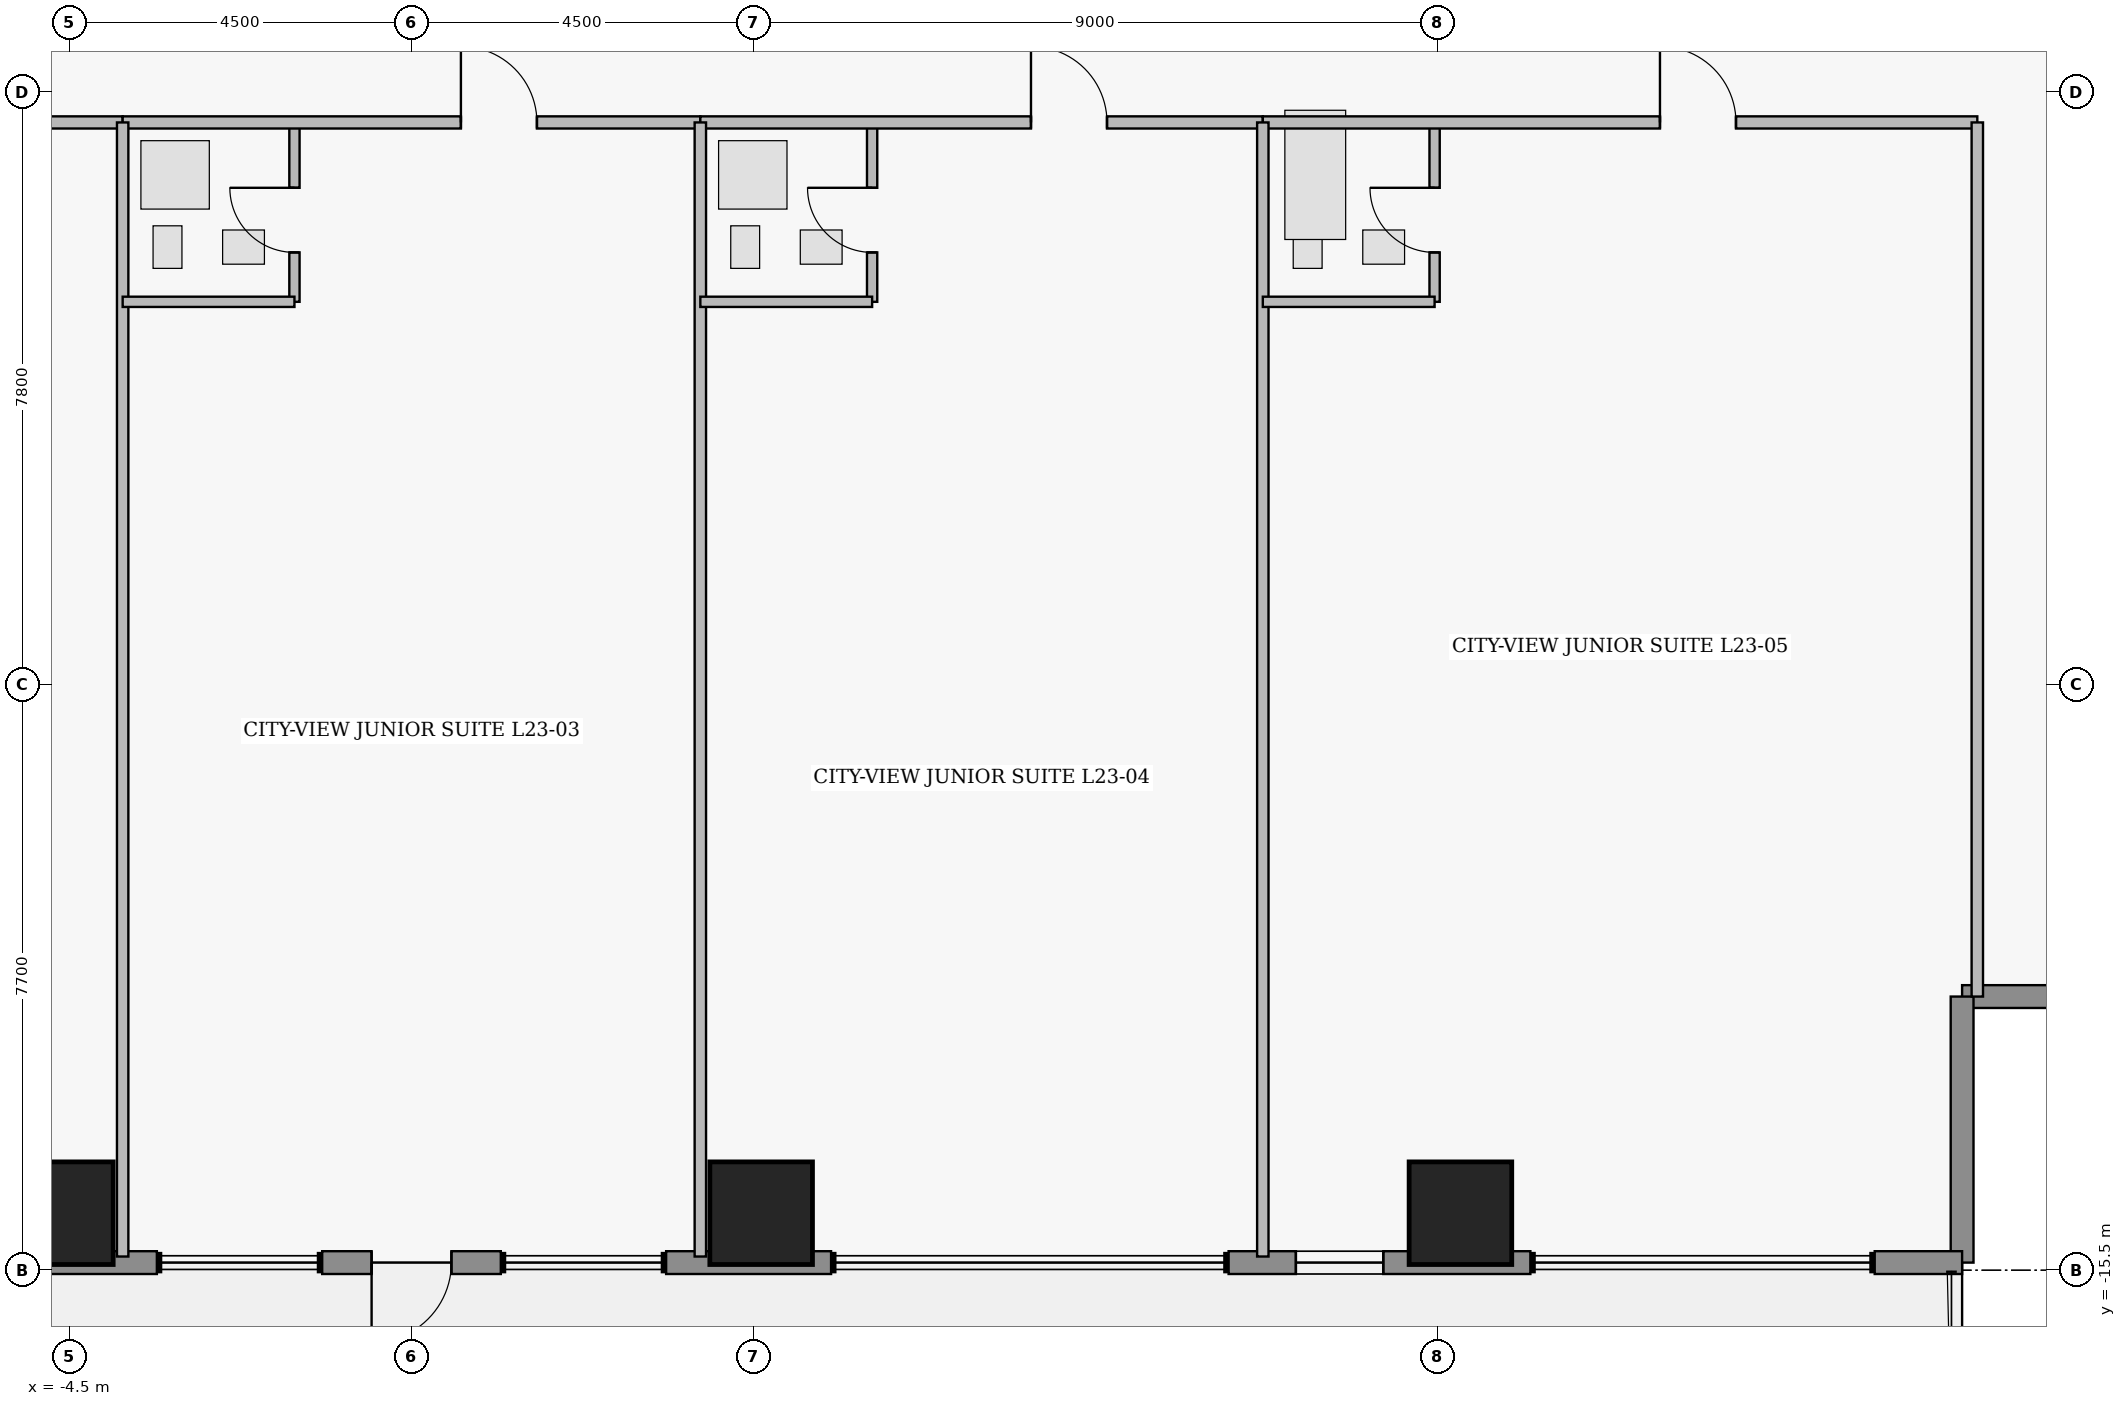
"""IFC4 building model, lengths in metres.
Left out: names, types, materials, properties, quantities, classifications, styles, units other than length and angle.
Written with IfcOpenShell. Run it as: python <this file> out.ifc"""

import sys

from ifc_helpers import new_model, si_unit, direction, frame, frame_2d, origin, origin_2d, place, context, subcontext, project, spatial, rectangle, extrude, element, fill, save


model = new_model("IFC4")
c1 = context("Model", 3, precision=1e-05, world=origin(), true_north=direction((0.0, 1.0)))
c2 = subcontext(c1, "Body", "Model", "MODEL_VIEW")
j1 = project(units=[si_unit("LENGTHUNIT", "METRE"), si_unit("PLANEANGLEUNIT", "RADIAN")], contexts=[c1])
p1 = place(None, origin())
s1 = spatial("IfcSite", under=j1, at=p1, CompositionType="ELEMENT")
p2 = place(p1, origin())
s2 = spatial("IfcBuilding", under=s1, at=p2, CompositionType="ELEMENT")
p3 = place(p2, frame((0.0, 0.0, 95.65)))
s3 = spatial("IfcBuildingStorey", under=s2, at=p3, CompositionType="ELEMENT", Elevation=95.65)
for number, where, z_axis, x_axis in (
    (1, (-4.6, -14.75, 0.43), (0.0, 0.0, 1.0), (1.0, 0.0, 0.0)),
    (2, (4.6, -14.75, 0.43), (0.0, 0.0, 1.0), (1.0, 0.0, 0.0)),
    (3, (13.8, -14.75, 0.43), (0.0, 0.0, 1.0), (1.0, 0.0, 0.0)),
):
    element("IfcColumn", number, at=place(p3, frame(where, z_axis=z_axis, x_axis=x_axis)), inside=s3, PredefinedType="COLUMN", context=c2, shape_type="SweptSolid", body=[
        extrude(rectangle(XDim=1.35, YDim=1.35, at=origin_2d()), origin(), (0.0, 0.0, 1.0), 3.22),
    ])
for number, where, z_axis, x_axis in (
    (4, (23.9, -11.9, 0.0), (0.0, 0.0, 1.0), (-1.0, 0.0, 0.0)),
    (5, (20.4, -11.9, 0.0), (0.0, 0.0, 1.0), (0.0, -1.0, 0.0)),
):
    element("IfcWall", number, at=place(p3, frame(where, z_axis=z_axis, x_axis=x_axis)), inside=s3, PredefinedType="STANDARD", context=c2, shape_type="SweptSolid", body=[
        extrude(rectangle(XDim=3.5, YDim=0.3, at=frame_2d((1.75, 0.0))), origin(), (0.0, 0.0, 1.0), 3.43),
    ])
p4 = place(p3, frame((20.4, -15.4, 0.0), z_axis=(0.0, 0.0, 1.0), x_axis=(-1.0, 0.0, 0.0)))
e6 = element("IfcWall", 6, at=p4, inside=s3, PredefinedType="STANDARD", context=c2, shape_type="SweptSolid", body=[
    extrude(rectangle(XDim=1.15, YDim=0.3, at=frame_2d((0.575, 0.0))), origin(), (0.0, 0.0, 1.0), 3.43),
])
p5 = place(p3, frame((14.72, -15.4, 0.0), z_axis=(0.0, 0.0, 1.0), x_axis=(-1.0, 0.0, 0.0)))
e7 = element("IfcWall", 7, at=p5, inside=s3, PredefinedType="STANDARD", context=c2, shape_type="SweptSolid", body=[
    extrude(rectangle(XDim=3.97, YDim=0.3, at=frame_2d((1.985, 0.0))), origin(), (0.0, 0.0, 1.0), 3.43),
])
p6 = place(p5, frame((1.935, 0.0, 0.95)))
e8 = element("IfcOpeningElement", 8, at=p6, cuts=e7, PredefinedType="OPENING", context=c2, shape_type="SweptSolid", body=[
    extrude(rectangle(XDim=1.15, YDim=1.55, at=frame_2d((0.575, 0.775))), frame((0.0, 0.16, 0.0), z_axis=(0.0, -1.0, 0.0), x_axis=(1.0, 0.0, 0.0)), (0.0, 0.0, 1.0), 0.32),
])
p7 = place(p3, frame((5.52, -15.4, 0.0), z_axis=(0.0, 0.0, 1.0), x_axis=(-1.0, 0.0, 0.0)))
e9 = element("IfcWall", 9, at=p7, inside=s3, PredefinedType="STANDARD", context=c2, shape_type="SweptSolid", body=[
    extrude(rectangle(XDim=2.17, YDim=0.3, at=frame_2d((1.085, 0.0))), origin(), (0.0, 0.0, 1.0), 3.43),
])
p8 = place(p3, frame((1.175, -15.4, 0.0), z_axis=(0.0, 0.0, 1.0), x_axis=(-1.0, 0.0, 0.0)))
e10 = element("IfcWall", 10, at=p8, inside=s3, PredefinedType="STANDARD", context=c2, shape_type="SweptSolid", body=[
    extrude(rectangle(XDim=2.35, YDim=0.3, at=frame_2d((1.175, 0.0))), origin(), (0.0, 0.0, 1.0), 3.43),
])
p9 = place(p8, frame((0.65, 0.0, 0.0)))
e11 = element("IfcOpeningElement", 11, at=p9, cuts=e10, PredefinedType="OPENING", context=c2, shape_type="SweptSolid", body=[
    extrude(rectangle(XDim=1.05, YDim=2.2, at=frame_2d((0.525, 1.1))), frame((0.0, 0.16, 0.0), z_axis=(0.0, -1.0, 0.0), x_axis=(1.0, 0.0, 0.0)), (0.0, 0.0, 1.0), 0.32),
])
p10 = place(p3, frame((-3.35, -15.4, 0.0), z_axis=(0.0, 0.0, 1.0), x_axis=(-1.0, 0.0, 0.0)))
e12 = element("IfcWall", 12, at=p10, inside=s3, PredefinedType="STANDARD", context=c2, shape_type="SweptSolid", body=[
    extrude(rectangle(XDim=2.17, YDim=0.3, at=frame_2d((1.085, 0.0))), origin(), (0.0, 0.0, 1.0), 3.43),
])
p11 = place(p3, frame((-11.2, -0.4, 0.0), z_axis=(0.0, 0.0, 1.0), x_axis=(1.0, 0.0, 0.0)))
e13 = element("IfcWall", 13, at=p11, inside=s3, PredefinedType="PARTITIONING", context=c2, shape_type="SweptSolid", body=[
    extrude(rectangle(XDim=7.4, YDim=0.16, at=frame_2d((3.7, 0.0))), origin(), (0.0, 0.0, 1.0), 3.43),
])
p12 = place(p11, frame((4.35, 0.0, 0.0)))
e14 = element("IfcOpeningElement", 14, at=p12, cuts=e13, PredefinedType="OPENING", context=c2, shape_type="SweptSolid", body=[
    extrude(rectangle(XDim=1.0, YDim=2.15, at=frame_2d((0.5, 1.075))), frame((0.0, 0.09, 0.0), z_axis=(0.0, -1.0, 0.0), x_axis=(1.0, 0.0, 0.0)), (0.0, 0.0, 1.0), 0.18),
])
p13 = place(p3, frame((-1.54, -2.76, 0.0), z_axis=(0.0, 0.0, 1.0), x_axis=(0.0, 1.0, 0.0)))
e15 = element("IfcWall", 15, at=p13, inside=s3, PredefinedType="PLUMBINGWALL", context=c2, shape_type="SweptSolid", body=[
    extrude(rectangle(XDim=2.36, YDim=0.135, at=frame_2d((1.18, 0.0))), origin(), (0.0, 0.0, 1.0), 3.43),
])
p14 = place(p13, frame((0.65, 0.0, 0.0)))
e16 = element("IfcOpeningElement", 16, at=p14, cuts=e15, PredefinedType="OPENING", context=c2, shape_type="SweptSolid", body=[
    extrude(rectangle(XDim=0.85, YDim=2.1, at=frame_2d((0.425, 1.05))), frame((0.0, 0.077, 0.0), z_axis=(0.0, -1.0, 0.0), x_axis=(1.0, 0.0, 0.0)), (0.0, 0.0, 1.0), 0.155),
])
p15 = place(p3, frame((-3.8, -0.4, 0.0), z_axis=(0.0, 0.0, 1.0), x_axis=(1.0, 0.0, 0.0)))
e17 = element("IfcWall", 17, at=p15, inside=s3, PredefinedType="PARTITIONING", context=c2, shape_type="SweptSolid", body=[
    extrude(rectangle(XDim=7.6, YDim=0.16, at=frame_2d((3.8, 0.0))), origin(), (0.0, 0.0, 1.0), 3.43),
])
p16 = place(p15, frame((4.45, 0.0, 0.0)))
e18 = element("IfcOpeningElement", 18, at=p16, cuts=e17, PredefinedType="OPENING", context=c2, shape_type="SweptSolid", body=[
    extrude(rectangle(XDim=1.0, YDim=2.15, at=frame_2d((0.5, 1.075))), frame((0.0, 0.09, 0.0), z_axis=(0.0, -1.0, 0.0), x_axis=(1.0, 0.0, 0.0)), (0.0, 0.0, 1.0), 0.18),
])
p17 = place(p3, frame((6.06, -2.76, 0.0), z_axis=(0.0, 0.0, 1.0), x_axis=(0.0, 1.0, 0.0)))
e19 = element("IfcWall", 19, at=p17, inside=s3, PredefinedType="PLUMBINGWALL", context=c2, shape_type="SweptSolid", body=[
    extrude(rectangle(XDim=2.36, YDim=0.135, at=frame_2d((1.18, 0.0))), origin(), (0.0, 0.0, 1.0), 3.43),
])
p18 = place(p17, frame((0.65, 0.0, 0.0)))
e20 = element("IfcOpeningElement", 20, at=p18, cuts=e19, PredefinedType="OPENING", context=c2, shape_type="SweptSolid", body=[
    extrude(rectangle(XDim=0.85, YDim=2.1, at=frame_2d((0.425, 1.05))), frame((0.0, 0.077, 0.0), z_axis=(0.0, -1.0, 0.0), x_axis=(1.0, 0.0, 0.0)), (0.0, 0.0, 1.0), 0.155),
])
p19 = place(p3, frame((3.8, -0.4, 0.0), z_axis=(0.0, 0.0, 1.0), x_axis=(1.0, 0.0, 0.0)))
e21 = element("IfcWall", 21, at=p19, inside=s3, PredefinedType="PARTITIONING", context=c2, shape_type="SweptSolid", body=[
    extrude(rectangle(XDim=7.4, YDim=0.16, at=frame_2d((3.7, 0.0))), origin(), (0.0, 0.0, 1.0), 3.43),
])
p20 = place(p19, frame((4.35, 0.0, 0.0)))
e22 = element("IfcOpeningElement", 22, at=p20, cuts=e21, PredefinedType="OPENING", context=c2, shape_type="SweptSolid", body=[
    extrude(rectangle(XDim=1.0, YDim=2.15, at=frame_2d((0.5, 1.075))), frame((0.0, 0.09, 0.0), z_axis=(0.0, -1.0, 0.0), x_axis=(1.0, 0.0, 0.0)), (0.0, 0.0, 1.0), 0.18),
])
p21 = place(p3, frame((13.46, -2.76, 0.0), z_axis=(0.0, 0.0, 1.0), x_axis=(0.0, 1.0, 0.0)))
e23 = element("IfcWall", 23, at=p21, inside=s3, PredefinedType="PLUMBINGWALL", context=c2, shape_type="SweptSolid", body=[
    extrude(rectangle(XDim=2.36, YDim=0.135, at=frame_2d((1.18, 0.0))), origin(), (0.0, 0.0, 1.0), 2.747),
])
p22 = place(p21, frame((0.65, 0.0, 0.0)))
e24 = element("IfcOpeningElement", 24, at=p22, cuts=e23, PredefinedType="OPENING", context=c2, shape_type="SweptSolid", body=[
    extrude(rectangle(XDim=0.85, YDim=2.1, at=frame_2d((0.425, 1.05))), frame((0.0, 0.077, 0.0), z_axis=(0.0, -1.0, 0.0), x_axis=(1.0, 0.0, 0.0)), (0.0, 0.0, 1.0), 0.155),
])
p23 = place(p3, frame((11.2, -0.4, 0.0), z_axis=(0.0, 0.0, 1.0), x_axis=(1.0, 0.0, 0.0)))
e25 = element("IfcWall", 25, at=p23, inside=s3, PredefinedType="PARTITIONING", context=c2, shape_type="SweptSolid", body=[
    extrude(rectangle(XDim=9.4, YDim=0.16, at=frame_2d((4.7, 0.0))), origin(), (0.0, 0.0, 1.0), 3.43),
])
p24 = place(p23, frame((5.225, 0.0, 0.0)))
e26 = element("IfcOpeningElement", 26, at=p24, cuts=e25, PredefinedType="OPENING", context=c2, shape_type="SweptSolid", body=[
    extrude(rectangle(XDim=1.0, YDim=2.15, at=frame_2d((0.5, 1.075))), frame((0.0, 0.09, 0.0), z_axis=(0.0, -1.0, 0.0), x_axis=(1.0, 0.0, 0.0)), (0.0, 0.0, 1.0), 0.18),
])
p25 = place(p3, frame((-3.8, -15.32, 0.0), z_axis=(0.0, 0.0, 1.0), x_axis=(0.0, 1.0, 0.0)))
e27 = element("IfcWall", 27, at=p25, inside=s3, PredefinedType="PARTITIONING", context=c2, shape_type="SweptSolid", body=[
    extrude(rectangle(XDim=14.92, YDim=0.15, at=frame_2d((7.46, 0.0))), origin(), (0.0, 0.0, 1.0), 3.43),
])
p26 = place(p3, frame((-3.8, -2.76, 0.0), z_axis=(0.0, 0.0, 1.0), x_axis=(1.0, 0.0, 0.0)))
e28 = element("IfcWall", 28, at=p26, inside=s3, PredefinedType="PLUMBINGWALL", context=c2, shape_type="SweptSolid", body=[
    extrude(rectangle(XDim=2.26, YDim=0.135, at=frame_2d((1.13, 0.0))), origin(), (0.0, 0.0, 1.0), 3.43),
])
p27 = place(p3, frame((3.8, -15.32, 0.0), z_axis=(0.0, 0.0, 1.0), x_axis=(0.0, 1.0, 0.0)))
e29 = element("IfcWall", 29, at=p27, inside=s3, PredefinedType="PARTITIONING", context=c2, shape_type="SweptSolid", body=[
    extrude(rectangle(XDim=14.92, YDim=0.15, at=frame_2d((7.46, 0.0))), origin(), (0.0, 0.0, 1.0), 3.43),
])
p28 = place(p3, frame((3.8, -2.76, 0.0), z_axis=(0.0, 0.0, 1.0), x_axis=(1.0, 0.0, 0.0)))
e30 = element("IfcWall", 30, at=p28, inside=s3, PredefinedType="PLUMBINGWALL", context=c2, shape_type="SweptSolid", body=[
    extrude(rectangle(XDim=2.26, YDim=0.135, at=frame_2d((1.13, 0.0))), origin(), (0.0, 0.0, 1.0), 3.43),
])
p29 = place(p3, frame((11.2, -15.32, 0.0), z_axis=(0.0, 0.0, 1.0), x_axis=(0.0, 1.0, 0.0)))
e31 = element("IfcWall", 31, at=p29, inside=s3, PredefinedType="PARTITIONING", context=c2, shape_type="SweptSolid", body=[
    extrude(rectangle(XDim=14.92, YDim=0.15, at=frame_2d((7.46, 0.0))), origin(), (0.0, 0.0, 1.0), 3.43),
])
p30 = place(p3, frame((11.2, -2.76, 0.0), z_axis=(0.0, 0.0, 1.0), x_axis=(1.0, 0.0, 0.0)))
e32 = element("IfcWall", 32, at=p30, inside=s3, PredefinedType="PLUMBINGWALL", context=c2, shape_type="SweptSolid", body=[
    extrude(rectangle(XDim=2.26, YDim=0.135, at=frame_2d((1.13, 0.0))), origin(), (0.0, 0.0, 1.0), 3.43),
])
p31 = place(p3, frame((20.6, -11.9, 0.0), z_axis=(0.0, 0.0, 1.0), x_axis=(0.0, 1.0, 0.0)))
e33 = element("IfcWall", 33, at=p31, inside=s3, PredefinedType="PARTITIONING", context=c2, shape_type="SweptSolid", body=[
    extrude(rectangle(XDim=11.5, YDim=0.15, at=frame_2d((5.75, 0.0))), origin(), (0.0, 0.0, 1.0), 3.43),
])
p32 = place(p6, origin())
e34 = element("IfcWindow", 34, at=p32, inside=s3, PartitioningType="SINGLE_PANEL", PredefinedType="WINDOW", context=c2, shape_type="SweptSolid", body=[
    extrude(rectangle(XDim=1.15, YDim=1.55, at=frame_2d((0.575, 0.775))), frame((0.0, 0.03, 0.0), z_axis=(0.0, -1.0, 0.0), x_axis=(1.0, 0.0, 0.0)), (0.0, 0.0, 1.0), 0.06),
])
fill(e8, e34)
p33 = place(p9, origin())
e35 = element("IfcDoor", 35, at=p33, inside=s3, OperationType="SINGLE_SWING_RIGHT", PredefinedType="DOOR", context=c2, shape_type="SweptSolid", body=[
    extrude(rectangle(XDim=1.05, YDim=2.2, at=frame_2d((0.525, 1.1))), frame((0.0, 0.025, 0.0), z_axis=(0.0, -1.0, 0.0), x_axis=(1.0, 0.0, 0.0)), (0.0, 0.0, 1.0), 0.05),
])
fill(e11, e35)
p34 = place(p14, origin())
e36 = element("IfcDoor", 36, at=p34, inside=s3, OperationType="SINGLE_SWING_RIGHT", PredefinedType="DOOR", context=c2, shape_type="SweptSolid", body=[
    extrude(rectangle(XDim=0.85, YDim=2.1, at=frame_2d((0.425, 1.05))), frame((0.0, 0.025, 0.0), z_axis=(0.0, -1.0, 0.0), x_axis=(1.0, 0.0, 0.0)), (0.0, 0.0, 1.0), 0.05),
])
fill(e16, e36)
p35 = place(p16, origin())
e37 = element("IfcDoor", 37, at=p35, inside=s3, OperationType="SINGLE_SWING_LEFT", PredefinedType="DOOR", context=c2, shape_type="SweptSolid", body=[
    extrude(rectangle(XDim=1.0, YDim=2.15, at=frame_2d((0.5, 1.075))), frame((0.0, 0.025, 0.0), z_axis=(0.0, -1.0, 0.0), x_axis=(1.0, 0.0, 0.0)), (0.0, 0.0, 1.0), 0.05),
])
fill(e18, e37)
p36 = place(p18, origin())
e38 = element("IfcDoor", 38, at=p36, inside=s3, OperationType="SINGLE_SWING_RIGHT", PredefinedType="DOOR", context=c2, shape_type="SweptSolid", body=[
    extrude(rectangle(XDim=0.85, YDim=2.1, at=frame_2d((0.425, 1.05))), frame((0.0, 0.025, 0.0), z_axis=(0.0, -1.0, 0.0), x_axis=(1.0, 0.0, 0.0)), (0.0, 0.0, 1.0), 0.05),
])
fill(e20, e38)
p37 = place(p20, origin())
e39 = element("IfcDoor", 39, at=p37, inside=s3, OperationType="SINGLE_SWING_LEFT", PredefinedType="DOOR", context=c2, shape_type="SweptSolid", body=[
    extrude(rectangle(XDim=1.0, YDim=2.15, at=frame_2d((0.5, 1.075))), frame((0.0, 0.025, 0.0), z_axis=(0.0, -1.0, 0.0), x_axis=(1.0, 0.0, 0.0)), (0.0, 0.0, 1.0), 0.05),
])
fill(e22, e39)
p38 = place(p22, origin())
e40 = element("IfcDoor", 40, at=p38, inside=s3, OperationType="SINGLE_SWING_RIGHT", PredefinedType="DOOR", context=c2, shape_type="SweptSolid", body=[
    extrude(rectangle(XDim=0.85, YDim=2.1, at=frame_2d((0.425, 1.05))), frame((0.0, 0.025, 0.0), z_axis=(0.0, -1.0, 0.0), x_axis=(1.0, 0.0, 0.0)), (0.0, 0.0, 1.0), 0.05),
])
fill(e24, e40)
p39 = place(p24, origin())
e41 = element("IfcDoor", 41, at=p39, inside=s3, OperationType="SINGLE_SWING_LEFT", PredefinedType="DOOR", context=c2, shape_type="SweptSolid", body=[
    extrude(rectangle(XDim=1.0, YDim=2.15, at=frame_2d((0.5, 1.075))), frame((0.0, 0.025, 0.0), z_axis=(0.0, -1.0, 0.0), x_axis=(1.0, 0.0, 0.0)), (0.0, 0.0, 1.0), 0.05),
])
fill(e26, e41)
save(model, sys.argv[1])
